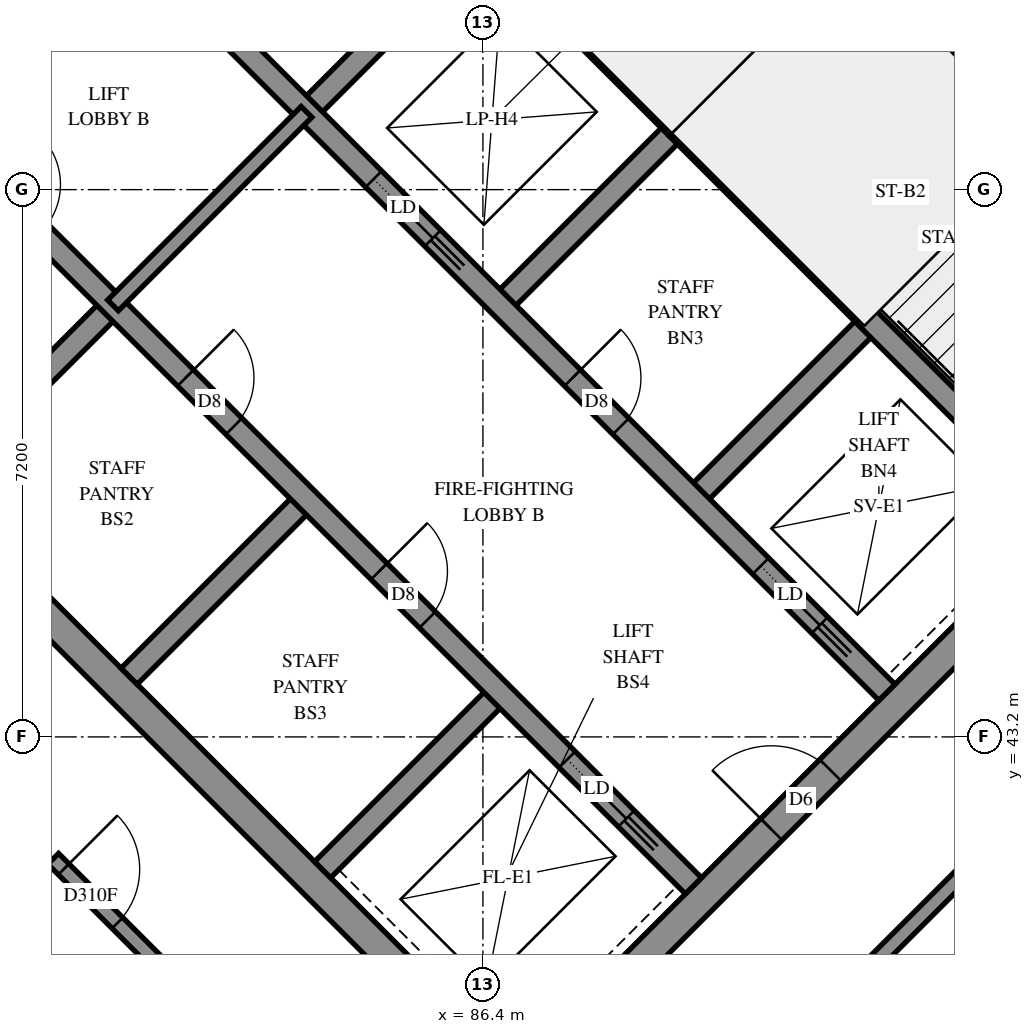
"""IFC4 building model, lengths in metres.
Left out: names, types, materials, properties, quantities, classifications, styles, units other than length and angle.
Written with IfcOpenShell. Run it as: python <this file> out.ifc"""

import sys

from ifc_helpers import new_model, si_unit, direction, frame, frame_2d, origin, place, context, subcontext, project, spatial, rectangle, extrude, element, fill, save


model = new_model("IFC4")
c1 = context("Model", 3, precision=1e-05, world=origin(), true_north=direction((0.0, 1.0)))
c2 = subcontext(c1, "Body", "Model", "MODEL_VIEW")
j1 = project(units=[si_unit("LENGTHUNIT", "METRE"), si_unit("PLANEANGLEUNIT", "RADIAN")], contexts=[c1])
p1 = place(None, origin())
s1 = spatial("IfcSite", under=j1, at=p1, CompositionType="ELEMENT")
p2 = place(p1, origin())
s2 = spatial("IfcBuilding", under=s1, at=p2, CompositionType="ELEMENT")
p3 = place(p2, frame((0.0, 0.0, 254.0)))
s3 = spatial("IfcBuildingStorey", under=s2, at=p3, CompositionType="ELEMENT", Elevation=254.0)
p4 = place(p3, frame((76.23, 49.231, -0.3), z_axis=(0.0, 0.0, 1.0), x_axis=(0.7071034917, -0.7071100706, 0.0)))
e1 = element("IfcWall", 1, at=p4, inside=s3, PredefinedType="SHEAR", context=c2, shape_type="SweptSolid", body=[
    extrude(rectangle(XDim=15.2, YDim=0.4, at=frame_2d((7.6, 0.0))), origin(), (0.0, 0.0, 1.0), 2.7),
])
p5 = place(p3, frame((86.695, 59.696, -0.3), z_axis=(0.0, 0.0, 1.0), x_axis=(0.7071100706, -0.7071034917, 0.0)))
e2 = element("IfcWall", 2, at=p5, inside=s3, PredefinedType="SHEAR", context=c2, shape_type="SweptSolid", body=[
    extrude(rectangle(XDim=15.2, YDim=0.4, at=frame_2d((7.6, 0.0))), origin(), (0.0, 0.0, 1.0), 2.7),
])
p6 = place(p5, frame((10.4, 0.0, 0.3)))
e3 = element("IfcOpeningElement", 3, at=p6, cuts=e2, PredefinedType="OPENING", context=c2, shape_type="SweptSolid", body=[
    extrude(rectangle(XDim=0.8, YDim=2.1, at=frame_2d((0.4, 1.05))), frame((0.0, 0.21, 0.0), z_axis=(0.0, -1.0, 0.0), x_axis=(1.0, 0.0, 0.0)), (0.0, 0.0, 1.0), 0.42),
])
p7 = place(p3, frame((76.513, 49.231, -0.3), z_axis=(0.0, 0.0, 1.0), x_axis=(0.7071067812, 0.7071067812, 0.0)))
e4 = element("IfcWall", 4, at=p7, inside=s3, PredefinedType="SHEAR", context=c2, shape_type="SweptSolid", body=[
    extrude(rectangle(XDim=14.4, YDim=0.4, at=frame_2d((7.2, 0.0))), origin(), (0.0, 0.0, 1.0), 2.7),
])
p8 = place(p7, frame((4.55, 0.0, 0.3)))
e5 = element("IfcOpeningElement", 5, at=p8, cuts=e4, PredefinedType="OPENING", context=c2, shape_type="SweptSolid", body=[
    extrude(rectangle(XDim=1.1, YDim=2.1, at=frame_2d((0.55, 1.05))), frame((0.0, 0.21, 0.0), z_axis=(0.0, -1.0, 0.0), x_axis=(1.0, 0.0, 0.0)), (0.0, 0.0, 1.0), 0.42),
])
p9 = place(p7, frame((11.35, 0.0, 0.3)))
e6 = element("IfcOpeningElement", 6, at=p9, cuts=e4, PredefinedType="OPENING", context=c2, shape_type="SweptSolid", body=[
    extrude(rectangle(XDim=1.1, YDim=2.1, at=frame_2d((0.55, 1.05))), frame((0.0, 0.21, 0.0), z_axis=(0.0, -1.0, 0.0), x_axis=(1.0, 0.0, 0.0)), (0.0, 0.0, 1.0), 0.42),
])
p10 = place(p3, frame((86.978, 38.766, -0.3), z_axis=(0.0, 0.0, 1.0), x_axis=(0.7071067812, 0.7071067812, 0.0)))
e7 = element("IfcWall", 7, at=p10, inside=s3, PredefinedType="SHEAR", context=c2, shape_type="SweptSolid", body=[
    extrude(rectangle(XDim=14.4, YDim=0.4, at=frame_2d((7.2, 0.0))), origin(), (0.0, 0.0, 1.0), 2.7),
])
p11 = place(p10, frame((4.55, 0.0, 0.3)))
e8 = element("IfcOpeningElement", 8, at=p11, cuts=e7, PredefinedType="OPENING", context=c2, shape_type="SweptSolid", body=[
    extrude(rectangle(XDim=1.1, YDim=2.1, at=frame_2d((0.55, 1.05))), frame((0.0, 0.21, 0.0), z_axis=(0.0, -1.0, 0.0), x_axis=(1.0, 0.0, 0.0)), (0.0, 0.0, 1.0), 0.42),
])
p12 = place(p10, frame((11.35, 0.0, 0.3)))
e9 = element("IfcOpeningElement", 9, at=p12, cuts=e7, PredefinedType="OPENING", context=c2, shape_type="SweptSolid", body=[
    extrude(rectangle(XDim=1.1, YDim=2.1, at=frame_2d((0.55, 1.05))), frame((0.0, 0.21, 0.0), z_axis=(0.0, -1.0, 0.0), x_axis=(1.0, 0.0, 0.0)), (0.0, 0.0, 1.0), 0.42),
])
for number, where, z_axis, x_axis in (
    (10, (79.2, 46.544, 0.0), (0.0, 0.0, 1.0), (0.707, 0.707, 0.0)),
    (11, (84.079, 51.423, 0.0), (0.0, 0.0, 1.0), (0.707, 0.707, 0.0)),
):
    element("IfcWall", number, at=place(p3, frame(where, z_axis=z_axis, x_axis=x_axis)), inside=s3, PredefinedType="SOLIDWALL", context=c2, shape_type="SweptSolid", body=[
        extrude(rectangle(XDim=3.3, YDim=0.3, at=frame_2d((1.65, 0.0))), origin(), (0.0, 0.0, 1.0), 3.1),
    ])
p13 = place(p3, frame((81.746, 43.999, 0.0), z_axis=(0.0, 0.0, 1.0), x_axis=(0.7071067812, 0.7071067812, 0.0)))
e12 = element("IfcWall", 12, at=p13, inside=s3, PredefinedType="SOLIDWALL", context=c2, shape_type="SweptSolid", body=[
    extrude(rectangle(XDim=3.3, YDim=0.3, at=frame_2d((1.65, 0.0))), origin(), (0.0, 0.0, 1.0), 3.1),
])
p14 = place(p3, frame((86.625, 48.878, 0.0), z_axis=(0.0, 0.0, 1.0), x_axis=(0.7071067812, 0.7071067812, 0.0)))
e13 = element("IfcWall", 13, at=p14, inside=s3, PredefinedType="SOLIDWALL", context=c2, shape_type="SweptSolid", body=[
    extrude(rectangle(XDim=3.3, YDim=0.3, at=frame_2d((1.65, 0.0))), origin(), (0.0, 0.0, 1.0), 3.1),
])
p15 = place(p3, frame((84.291, 41.453, 0.0), z_axis=(0.0, 0.0, 1.0), x_axis=(0.7071067812, 0.7071067812, 0.0)))
e14 = element("IfcWall", 14, at=p15, inside=s3, PredefinedType="SOLIDWALL", context=c2, shape_type="SweptSolid", body=[
    extrude(rectangle(XDim=3.3, YDim=0.3, at=frame_2d((1.65, 0.0))), origin(), (0.0, 0.0, 1.0), 3.1),
])
p16 = place(p3, frame((89.17, 46.332, 0.0), z_axis=(0.0, 0.0, 1.0), x_axis=(0.7071067812, 0.7071067812, 0.0)))
e15 = element("IfcWall", 15, at=p16, inside=s3, PredefinedType="SOLIDWALL", context=c2, shape_type="SweptSolid", body=[
    extrude(rectangle(XDim=3.3, YDim=0.3, at=frame_2d((1.65, 0.0))), origin(), (0.0, 0.0, 1.0), 3.1),
])
p17 = place(p3, frame((78.988, 51.423, 0.0), z_axis=(0.0, 0.0, 1.0), x_axis=(0.7071067812, -0.7071067812, 0.0)))
e16 = element("IfcWall", 16, at=p17, inside=s3, PredefinedType="SOLIDWALL", context=c2, shape_type="SweptSolid", body=[
    extrude(rectangle(XDim=14.4, YDim=0.3, at=frame_2d((7.2, 0.0))), origin(), (0.0, 0.0, 1.0), 3.1),
])
p18 = place(p17, frame((1.35, 0.0, 0.0)))
e17 = element("IfcOpeningElement", 17, at=p18, cuts=e16, PredefinedType="OPENING", context=c2, shape_type="SweptSolid", body=[
    extrude(rectangle(XDim=0.9, YDim=2.1, at=frame_2d((0.45, 1.05))), frame((0.0, 0.16, 0.0), z_axis=(0.0, -1.0, 0.0), x_axis=(1.0, 0.0, 0.0)), (0.0, 0.0, 1.0), 0.32),
])
p19 = place(p17, frame((4.95, 0.0, 0.0)))
e18 = element("IfcOpeningElement", 18, at=p19, cuts=e16, PredefinedType="OPENING", context=c2, shape_type="SweptSolid", body=[
    extrude(rectangle(XDim=0.9, YDim=2.1, at=frame_2d((0.45, 1.05))), frame((0.0, 0.16, 0.0), z_axis=(0.0, -1.0, 0.0), x_axis=(1.0, 0.0, 0.0)), (0.0, 0.0, 1.0), 0.32),
])
p20 = place(p17, frame((8.55, 0.0, 0.0)))
e19 = element("IfcOpeningElement", 19, at=p20, cuts=e16, PredefinedType="OPENING", context=c2, shape_type="SweptSolid", body=[
    extrude(rectangle(XDim=0.9, YDim=2.1, at=frame_2d((0.45, 1.05))), frame((0.0, 0.16, 0.0), z_axis=(0.0, -1.0, 0.0), x_axis=(1.0, 0.0, 0.0)), (0.0, 0.0, 1.0), 0.32),
])
p21 = place(p17, frame((12.05, 0.0, 0.0)))
e20 = element("IfcOpeningElement", 20, at=p21, cuts=e16, PredefinedType="OPENING", context=c2, shape_type="SweptSolid", body=[
    extrude(rectangle(XDim=1.1, YDim=2.1, at=frame_2d((0.55, 1.05))), frame((0.0, 0.16, 0.0), z_axis=(0.0, -1.0, 0.0), x_axis=(1.0, 0.0, 0.0)), (0.0, 0.0, 1.0), 0.32),
])
p22 = place(p3, frame((81.534, 53.969, 0.0), z_axis=(0.0, 0.0, 1.0), x_axis=(0.707103309, -0.7071102534, 0.0)))
e21 = element("IfcWall", 21, at=p22, inside=s3, PredefinedType="SOLIDWALL", context=c2, shape_type="SweptSolid", body=[
    extrude(rectangle(XDim=14.4, YDim=0.3, at=frame_2d((7.2, 0.0))), origin(), (0.0, 0.0, 1.0), 3.1),
])
p23 = place(p22, frame((8.55, 0.0, 0.0)))
e22 = element("IfcOpeningElement", 22, at=p23, cuts=e21, PredefinedType="OPENING", context=c2, shape_type="SweptSolid", body=[
    extrude(rectangle(XDim=0.9, YDim=2.1, at=frame_2d((0.45, 1.05))), frame((0.0, 0.16, 0.0), z_axis=(0.0, -1.0, 0.0), x_axis=(1.0, 0.0, 0.0)), (0.0, 0.0, 1.0), 0.32),
])
p24 = place(p22, frame((1.25, 0.0, 0.0)))
e23 = element("IfcOpeningElement", 23, at=p24, cuts=e21, PredefinedType="OPENING", context=c2, shape_type="SweptSolid", body=[
    extrude(rectangle(XDim=1.1, YDim=2.1, at=frame_2d((0.55, 1.05))), frame((0.0, 0.16, 0.0), z_axis=(0.0, -1.0, 0.0), x_axis=(1.0, 0.0, 0.0)), (0.0, 0.0, 1.0), 0.32),
])
p25 = place(p22, frame((4.85, 0.0, 0.0)))
e24 = element("IfcOpeningElement", 24, at=p25, cuts=e21, PredefinedType="OPENING", context=c2, shape_type="SweptSolid", body=[
    extrude(rectangle(XDim=1.1, YDim=2.1, at=frame_2d((0.55, 1.05))), frame((0.0, 0.16, 0.0), z_axis=(0.0, -1.0, 0.0), x_axis=(1.0, 0.0, 0.0)), (0.0, 0.0, 1.0), 0.32),
])
p26 = place(p22, frame((12.05, 0.0, 0.0)))
e25 = element("IfcOpeningElement", 25, at=p26, cuts=e21, PredefinedType="OPENING", context=c2, shape_type="SweptSolid", body=[
    extrude(rectangle(XDim=1.1, YDim=2.1, at=frame_2d((0.55, 1.05))), frame((0.0, 0.16, 0.0), z_axis=(0.0, -1.0, 0.0), x_axis=(1.0, 0.0, 0.0)), (0.0, 0.0, 1.0), 0.32),
])
for number, where, z_axis, x_axis in (
    (26, (83.867, 56.302, 0.0), (0.0, 0.0, 1.0), (0.707, -0.707, 0.0)),
    (27, (88.958, 51.211, 0.0), (0.0, 0.0, 1.0), (0.707, -0.707, 0.0)),
):
    element("IfcWall", number, at=place(p3, frame(where, z_axis=z_axis, x_axis=x_axis)), inside=s3, PredefinedType="SOLIDWALL", context=c2, shape_type="SweptSolid", body=[
        extrude(rectangle(XDim=7.2, YDim=0.3, at=frame_2d((3.6, 0.0))), origin(), (0.0, 0.0, 1.0), 3.1),
    ])
p27 = place(p3, frame((88.958, 51.211, 0.0), z_axis=(0.0, 0.0, 1.0), x_axis=(0.7071067812, 0.7071067812, 0.0)))
e28 = element("IfcWall", 28, at=p27, inside=s3, PredefinedType="SOLIDWALL", context=c2, shape_type="SweptSolid", body=[
    extrude(rectangle(XDim=4.2, YDim=0.3, at=frame_2d((2.1, 0.0))), origin(), (0.0, 0.0, 1.0), 3.1),
])
p28 = place(p3, frame((91.313, 53.354, 0.0), z_axis=(0.0, 0.0, 1.0), x_axis=(0.7071140275, -0.7070995348, 0.0)))
e29 = element("IfcWall", 29, at=p28, inside=s3, PredefinedType="PARTITIONING", context=c2, shape_type="SweptSolid", body=[
    extrude(rectangle(XDim=6.9, YDim=0.15, at=frame_2d((3.45, 0.0))), origin(), (0.0, 0.0, 1.0), 3.1),
])
p29 = place(p3, frame((81.534, 48.878, 0.0), z_axis=(0.0, 0.0, 1.0), x_axis=(0.707092892, 0.7071206701, 0.0)))
e30 = element("IfcWall", 30, at=p29, inside=s3, PredefinedType="PARTITIONING", context=c2, shape_type="SweptSolid", body=[
    extrude(rectangle(XDim=3.6, YDim=0.2, at=frame_2d((1.8, 0.0))), origin(), (0.0, 0.0, 1.0), 3.1),
])
p30 = place(p3, frame((84.944, 31.927, 0.0), z_axis=(0.0, 0.0, 1.0), x_axis=(0.7071768334, 0.7070367221, 0.0)))
e31 = element("IfcWall", 31, at=p30, inside=s3, PredefinedType="PARTITIONING", context=c2, shape_type="SweptSolid", body=[
    extrude(rectangle(XDim=14.274, YDim=0.2, at=frame_2d((7.137, 0.0))), origin(), (0.0, 0.0, 1.0), 3.1),
])
p31 = place(p3, frame((86.836, 35.514, 0.0), z_axis=(0.0, 0.0, 1.0), x_axis=(0.7071067812, 0.7071067812, 0.0)))
e32 = element("IfcWall", 32, at=p31, inside=s3, PredefinedType="PARTITIONING", context=c2, shape_type="SweptSolid", body=[
    extrude(rectangle(XDim=10.4, YDim=0.2, at=frame_2d((5.2, 0.0))), origin(), (0.0, 0.0, 1.0), 3.1),
])
p32 = place(p31, frame((9.207, 0.0, 0.0)))
e33 = element("IfcOpeningElement", 33, at=p32, cuts=e32, PredefinedType="OPENING", context=c2, shape_type="SweptSolid", body=[
    extrude(rectangle(XDim=1.0, YDim=2.1, at=frame_2d((0.5, 1.05))), frame((0.0, 0.11, 0.0), z_axis=(0.0, -1.0, 0.0), x_axis=(1.0, 0.0, 0.0)), (0.0, 0.0, 1.0), 0.22),
])
p33 = place(p3, frame((80.747, 41.597, 0.0), z_axis=(0.0, 0.0, 1.0), x_axis=(0.7071067812, -0.7071067812, 0.0)))
e34 = element("IfcWall", 34, at=p33, inside=s3, PredefinedType="PARTITIONING", context=c2, shape_type="SweptSolid", body=[
    extrude(rectangle(XDim=8.607, YDim=0.2, at=frame_2d((4.303, 0.0))), origin(), (0.0, 0.0, 1.0), 3.1),
])
p34 = place(p33, frame((0.195, 0.0, 0.0)))
e35 = element("IfcOpeningElement", 35, at=p34, cuts=e34, PredefinedType="OPENING", context=c2, shape_type="SweptSolid", body=[
    extrude(rectangle(XDim=1.0, YDim=2.1, at=frame_2d((0.5, 1.05))), frame((0.0, 0.11, 0.0), z_axis=(0.0, -1.0, 0.0), x_axis=(1.0, 0.0, 0.0)), (0.0, 0.0, 1.0), 0.22),
])
p35 = place(p33, frame((3.133, 0.0, 0.0)))
e36 = element("IfcOpeningElement", 36, at=p35, cuts=e34, PredefinedType="OPENING", context=c2, shape_type="SweptSolid", body=[
    extrude(rectangle(XDim=1.0, YDim=2.1, at=frame_2d((0.5, 1.05))), frame((0.0, 0.11, 0.0), z_axis=(0.0, -1.0, 0.0), x_axis=(1.0, 0.0, 0.0)), (0.0, 0.0, 1.0), 0.22),
])
p36 = place(p11, origin())
e37 = element("IfcDoor", 37, at=p36, inside=s3, OperationType="DOUBLE_DOOR_SINGLE_SWING", PredefinedType="DOOR", context=c2, shape_type="SweptSolid", body=[
    extrude(rectangle(XDim=1.1, YDim=2.1, at=frame_2d((0.55, 1.05))), frame((0.0, 0.025, 0.0), z_axis=(0.0, -1.0, 0.0), x_axis=(1.0, 0.0, 0.0)), (0.0, 0.0, 1.0), 0.05),
])
fill(e8, e37)
p37 = place(p19, origin())
e38 = element("IfcDoor", 38, at=p37, inside=s3, OperationType="SINGLE_SWING_LEFT", PredefinedType="DOOR", context=c2, shape_type="SweptSolid", body=[
    extrude(rectangle(XDim=0.9, YDim=2.1, at=frame_2d((0.45, 1.05))), frame((0.0, 0.025, 0.0), z_axis=(0.0, -1.0, 0.0), x_axis=(1.0, 0.0, 0.0)), (0.0, 0.0, 1.0), 0.05),
])
fill(e18, e38)
p38 = place(p20, origin())
e39 = element("IfcDoor", 39, at=p38, inside=s3, OperationType="SINGLE_SWING_LEFT", PredefinedType="DOOR", context=c2, shape_type="SweptSolid", body=[
    extrude(rectangle(XDim=0.9, YDim=2.1, at=frame_2d((0.45, 1.05))), frame((0.0, 0.025, 0.0), z_axis=(0.0, -1.0, 0.0), x_axis=(1.0, 0.0, 0.0)), (0.0, 0.0, 1.0), 0.05),
])
fill(e19, e39)
p39 = place(p23, origin())
e40 = element("IfcDoor", 40, at=p39, inside=s3, OperationType="SINGLE_SWING_LEFT", PredefinedType="DOOR", context=c2, shape_type="SweptSolid", body=[
    extrude(rectangle(XDim=0.9, YDim=2.1, at=frame_2d((0.45, 1.05))), frame((0.0, 0.025, 0.0), z_axis=(0.0, -1.0, 0.0), x_axis=(1.0, 0.0, 0.0)), (0.0, 0.0, 1.0), 0.05),
])
fill(e22, e40)
p40 = place(p21, origin())
e41 = element("IfcDoor", 41, at=p40, inside=s3, OperationType="SLIDING_TO_RIGHT", PredefinedType="DOOR", context=c2, shape_type="SweptSolid", body=[
    extrude(rectangle(XDim=1.1, YDim=2.1, at=frame_2d((0.55, 1.05))), frame((0.0, 0.025, 0.0), z_axis=(0.0, -1.0, 0.0), x_axis=(1.0, 0.0, 0.0)), (0.0, 0.0, 1.0), 0.05),
])
fill(e20, e41)
p41 = place(p25, origin())
e42 = element("IfcDoor", 42, at=p41, inside=s3, OperationType="SLIDING_TO_RIGHT", PredefinedType="DOOR", context=c2, shape_type="SweptSolid", body=[
    extrude(rectangle(XDim=1.1, YDim=2.1, at=frame_2d((0.55, 1.05))), frame((0.0, 0.025, 0.0), z_axis=(0.0, -1.0, 0.0), x_axis=(1.0, 0.0, 0.0)), (0.0, 0.0, 1.0), 0.05),
])
fill(e24, e42)
p42 = place(p26, origin())
e43 = element("IfcDoor", 43, at=p42, inside=s3, OperationType="SLIDING_TO_RIGHT", PredefinedType="DOOR", context=c2, shape_type="SweptSolid", body=[
    extrude(rectangle(XDim=1.1, YDim=2.1, at=frame_2d((0.55, 1.05))), frame((0.0, 0.025, 0.0), z_axis=(0.0, -1.0, 0.0), x_axis=(1.0, 0.0, 0.0)), (0.0, 0.0, 1.0), 0.05),
])
fill(e25, e43)
p43 = place(p34, origin())
e44 = element("IfcDoor", 44, at=p43, inside=s3, OperationType="SINGLE_SWING_LEFT", PredefinedType="DOOR", context=c2, shape_type="SweptSolid", body=[
    extrude(rectangle(XDim=1.0, YDim=2.1, at=frame_2d((0.5, 1.05))), frame((0.0, 0.025, 0.0), z_axis=(0.0, -1.0, 0.0), x_axis=(1.0, 0.0, 0.0)), (0.0, 0.0, 1.0), 0.05),
])
fill(e35, e44)
save(model, sys.argv[1])
